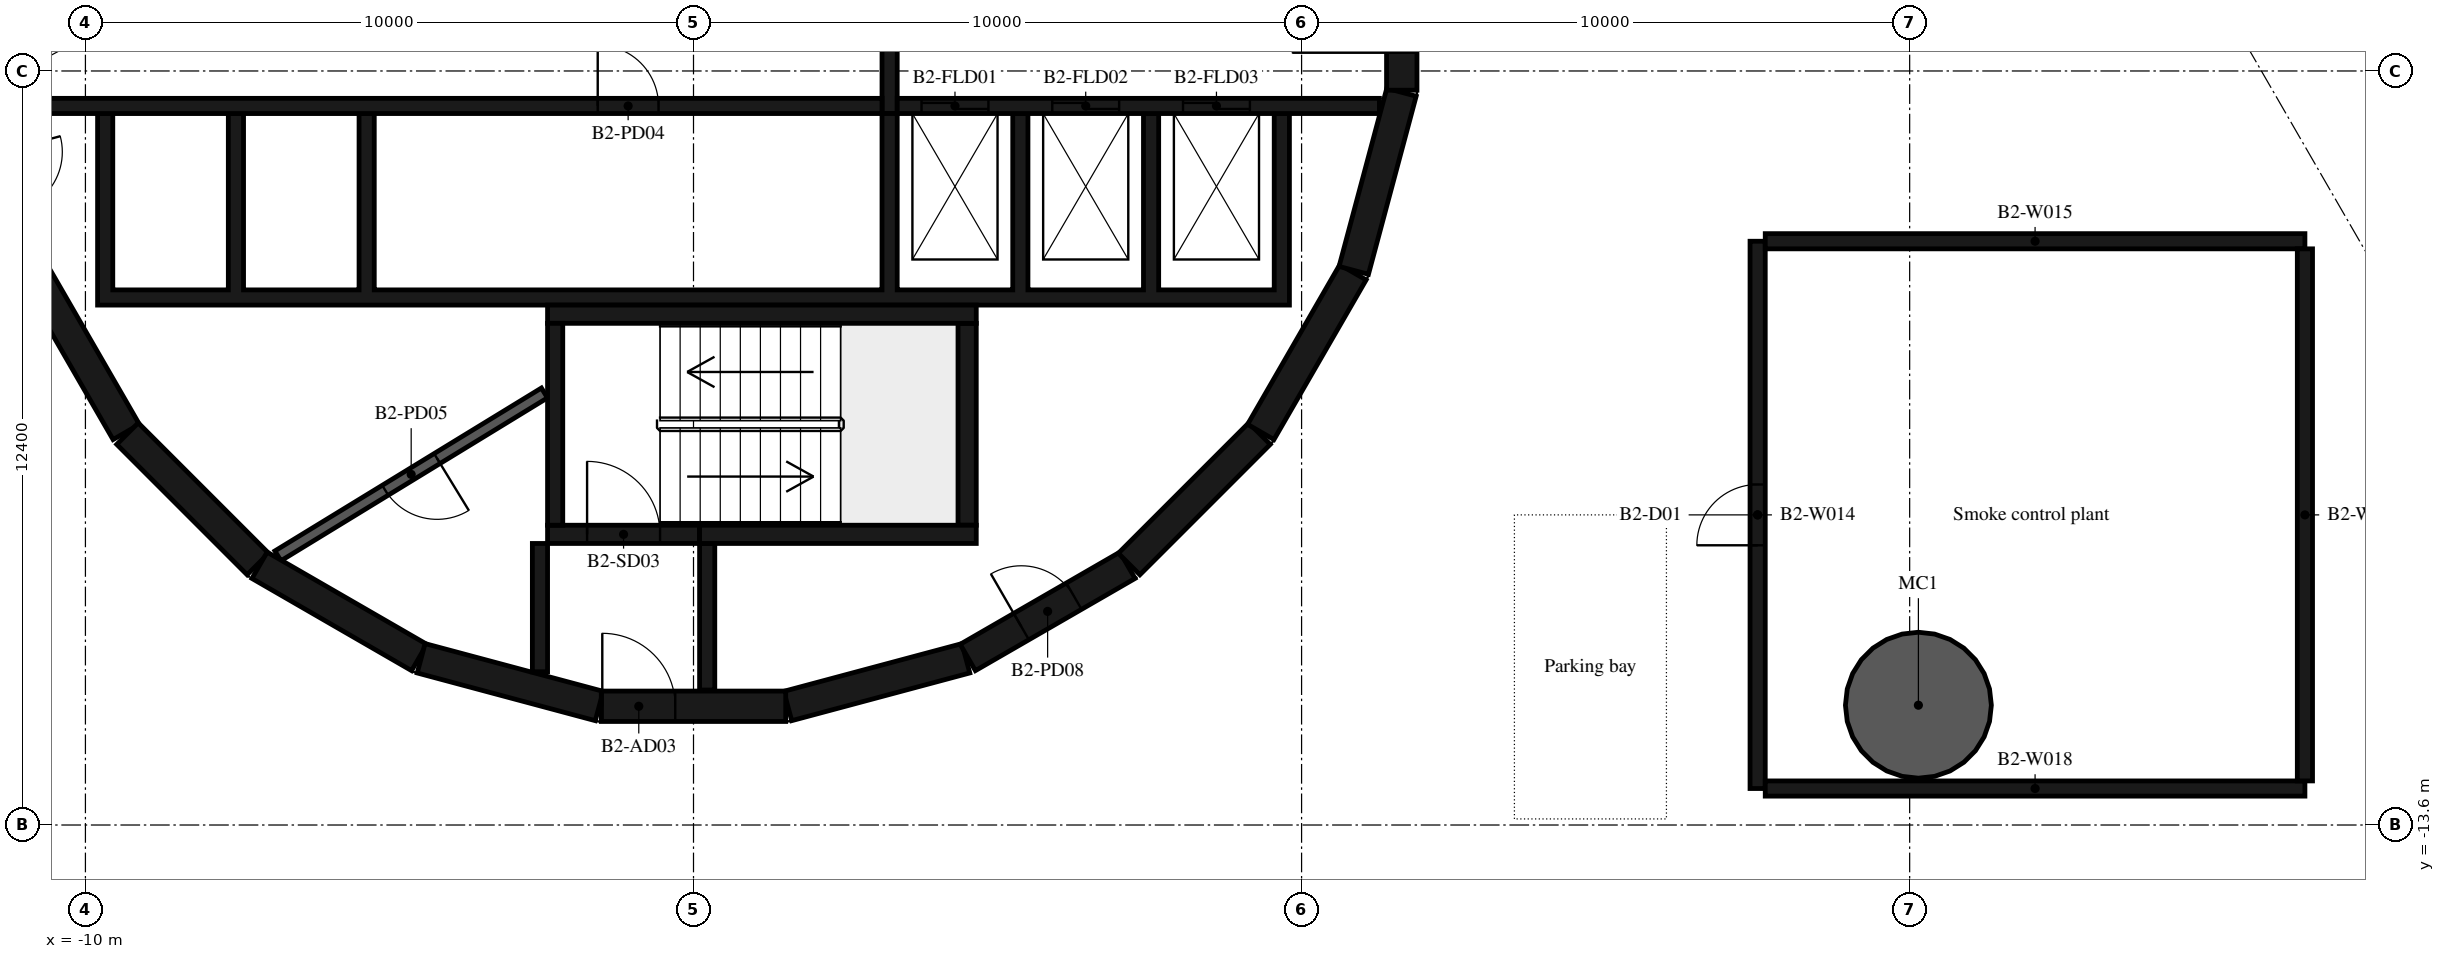
"""IFC4 building model, lengths in metres.
Left out: names, types, materials, properties, quantities, classifications, styles, units other than length and angle.
Written with IfcOpenShell. Run it as: python <this file> out.ifc"""

import sys

from ifc_helpers import new_model, si_unit, direction, frame, frame_2d, origin, origin_2d, place, context, subcontext, project, spatial, polyline, rectangle, hollow_circle, outline, extrude, element, fill, save


model = new_model("IFC4")
c1 = context("Model", 3, precision=1e-05, world=origin(), true_north=direction((0.0, 1.0)))
c2 = subcontext(c1, "Body", "Model", "MODEL_VIEW")
j1 = project(units=[si_unit("LENGTHUNIT", "METRE"), si_unit("PLANEANGLEUNIT", "RADIAN")], contexts=[c1])
p1 = place(None, origin())
s1 = spatial("IfcSite", under=j1, at=p1, CompositionType="ELEMENT")
p2 = place(p1, origin())
s2 = spatial("IfcBuilding", under=s1, at=p2, CompositionType="ELEMENT")
p3 = place(p2, frame((0.0, 0.0, -8.4)))
s3 = spatial("IfcBuildingStorey", under=s2, at=p3, CompositionType="ELEMENT", Elevation=-8.4)
p4 = place(p3, frame((20.144, -11.63, 0.0), z_axis=(0.0, 0.0, 1.0), x_axis=(1.0, 0.0, 0.0)))
e1 = element("IfcColumn", 1, at=p4, inside=s3, PredefinedType="COLUMN", context=c2, shape_type="SweptSolid", body=[
    extrude(hollow_circle(Radius=1.2, WallThickness=0.06, at=origin_2d()), origin(), (0.0, 0.0, 1.0), 3.82),
])
p5 = place(p3, frame((1.55, -11.643, 0.0), z_axis=(0.0, 0.0, 1.0), x_axis=(0.965948410781, 0.258734743916, 0.0)))
e2 = element("IfcWall", 2, at=p5, inside=s3, PredefinedType="SHEAR", context=c2, shape_type="SweptSolid", body=[
    extrude(rectangle(XDim=3.033, YDim=0.5, at=frame_2d((1.516, 0.0))), origin(), (0.0, 0.0, 1.0), 3.82),
])
p6 = place(p3, frame((4.51, -10.845, 0.0), z_axis=(0.0, 0.0, 1.0), x_axis=(0.865975092491, 0.500087131594, 0.0)))
e3 = element("IfcWall", 3, at=p6, inside=s3, PredefinedType="SHEAR", context=c2, shape_type="SweptSolid", body=[
    extrude(rectangle(XDim=3.033, YDim=0.5, at=frame_2d((1.516, 0.0))), origin(), (0.0, 0.0, 1.0), 3.82),
])
p7 = place(p6, frame((1.016, 0.0, 0.0)))
e4 = element("IfcOpeningElement", 4, at=p7, cuts=e3, PredefinedType="OPENING", context=c2, shape_type="SweptSolid", body=[
    extrude(rectangle(XDim=1.0, YDim=2.4, at=frame_2d((0.5, 1.2))), frame((0.0, 0.26, 0.0), z_axis=(0.0, -1.0, 0.0), x_axis=(1.0, 0.0, 0.0)), (0.0, 0.0, 1.0), 0.52),
])
p8 = place(p3, frame((7.164, -9.308, 0.0), z_axis=(0.0, 0.0, 1.0), x_axis=(0.707106781187, 0.707106781187, 0.0)))
e5 = element("IfcWall", 5, at=p8, inside=s3, PredefinedType="SHEAR", context=c2, shape_type="SweptSolid", body=[
    extrude(rectangle(XDim=3.032, YDim=0.5, at=frame_2d((1.516, 0.0))), origin(), (0.0, 0.0, 1.0), 3.82),
])
for number, where, z_axis, x_axis in (
    (6, (9.329, -7.137, 0.0), (0.0, 0.0, 1.0), (0.5, 0.866, 0.0)),
    (7, (10.858, -4.479, 0.0), (0.0, 0.0, 1.0), (0.259, 0.966, 0.0)),
):
    element("IfcWall", number, at=place(p3, frame(where, z_axis=z_axis, x_axis=x_axis)), inside=s3, PredefinedType="SHEAR", context=c2, shape_type="SweptSolid", body=[
        extrude(rectangle(XDim=3.033, YDim=0.5, at=frame_2d((1.516, 0.0))), origin(), (0.0, 0.0, 1.0), 3.82),
    ])
p9 = place(p3, frame((11.647, -1.516, 0.0), z_axis=(0.0, 0.0, 1.0), x_axis=(0.0, 1.0, 0.0)))
e8 = element("IfcWall", 8, at=p9, inside=s3, PredefinedType="SHEAR", context=c2, shape_type="SweptSolid", body=[
    extrude(rectangle(XDim=3.033, YDim=0.5, at=frame_2d((1.516, 0.0))), origin(), (0.0, 0.0, 1.0), 3.82),
])
p10 = place(p9, frame((0.616, 0.0, 0.0)))
e9 = element("IfcOpeningElement", 9, at=p10, cuts=e8, PredefinedType="OPENING", context=c2, shape_type="SweptSolid", body=[
    extrude(rectangle(XDim=1.8, YDim=2.1, at=frame_2d((0.9, 1.05))), frame((0.0, 0.26, 0.0), z_axis=(0.0, -1.0, 0.0), x_axis=(1.0, 0.0, 0.0)), (0.0, 0.0, 1.0), 0.52),
])
p11 = place(p3, frame((-10.845, -4.51, 0.0), z_axis=(0.0, 0.0, 1.0), x_axis=(0.500087131594, -0.865975092491, 0.0)))
e10 = element("IfcWall", 10, at=p11, inside=s3, PredefinedType="SHEAR", context=c2, shape_type="SweptSolid", body=[
    extrude(rectangle(XDim=3.033, YDim=0.5, at=frame_2d((1.516, 0.0))), origin(), (0.0, 0.0, 1.0), 3.82),
])
p12 = place(p3, frame((-9.308, -7.164, 0.0), z_axis=(0.0, 0.0, 1.0), x_axis=(0.707106781187, -0.707106781187, 0.0)))
e11 = element("IfcWall", 11, at=p12, inside=s3, PredefinedType="SHEAR", context=c2, shape_type="SweptSolid", body=[
    extrude(rectangle(XDim=3.032, YDim=0.5, at=frame_2d((1.516, 0.0))), origin(), (0.0, 0.0, 1.0), 3.82),
])
for number, where, z_axis, x_axis in (
    (12, (-7.137, -9.329, 0.0), (0.0, 0.0, 1.0), (0.866, -0.5, 0.0)),
    (13, (-4.479, -10.858, 0.0), (0.0, 0.0, 1.0), (0.966, -0.259, 0.0)),
):
    element("IfcWall", number, at=place(p3, frame(where, z_axis=z_axis, x_axis=x_axis)), inside=s3, PredefinedType="SHEAR", context=c2, shape_type="SweptSolid", body=[
        extrude(rectangle(XDim=3.033, YDim=0.5, at=frame_2d((1.516, 0.0))), origin(), (0.0, 0.0, 1.0), 3.82),
    ])
p13 = place(p3, frame((-1.516, -11.647, 0.0), z_axis=(0.0, 0.0, 1.0), x_axis=(1.0, 0.0, 0.0)))
e14 = element("IfcWall", 14, at=p13, inside=s3, PredefinedType="SHEAR", context=c2, shape_type="SweptSolid", body=[
    extrude(rectangle(XDim=3.033, YDim=0.5, at=frame_2d((1.516, 0.0))), origin(), (0.0, 0.0, 1.0), 3.82),
])
p14 = place(p13, frame((0.016, 0.0, 0.0)))
e15 = element("IfcOpeningElement", 15, at=p14, cuts=e14, PredefinedType="OPENING", context=c2, shape_type="SweptSolid", body=[
    extrude(rectangle(XDim=1.2, YDim=2.1, at=frame_2d((0.6, 1.05))), frame((0.0, 0.26, 0.0), z_axis=(0.0, -1.0, 0.0), x_axis=(1.0, 0.0, 0.0)), (0.0, 0.0, 1.0), 0.52),
])
p15 = place(p3, frame((-2.275, -8.67, 0.0), z_axis=(0.0, 0.0, 1.0), x_axis=(0.0, 1.0, 0.0)))
e16 = element("IfcWall", 16, at=p15, inside=s3, PredefinedType="SHEAR", context=c2, shape_type="SweptSolid", body=[
    extrude(rectangle(XDim=3.32, YDim=0.25, at=frame_2d((1.66, 0.0))), origin(), (0.0, 0.0, 1.0), 3.82),
])
p16 = place(p3, frame((-2.4, -5.2, 0.0), z_axis=(0.0, 0.0, 1.0), x_axis=(1.0, 0.0, 0.0)))
e17 = element("IfcWall", 17, at=p16, inside=s3, PredefinedType="SHEAR", context=c2, shape_type="SweptSolid", body=[
    extrude(rectangle(XDim=7.05, YDim=0.3, at=frame_2d((3.525, 0.0))), origin(), (0.0, 0.0, 1.0), 3.82),
])
p17 = place(p3, frame((4.5, -8.67, 0.0), z_axis=(0.0, 0.0, 1.0), x_axis=(0.0, 1.0, 0.0)))
e18 = element("IfcWall", 18, at=p17, inside=s3, PredefinedType="SHEAR", context=c2, shape_type="SweptSolid", body=[
    extrude(rectangle(XDim=3.32, YDim=0.3, at=frame_2d((1.66, 0.0))), origin(), (0.0, 0.0, 1.0), 3.82),
])
p18 = place(p3, frame((0.1, -8.82, 0.0), z_axis=(0.0, 0.0, 1.0), x_axis=(1.0, 0.0, 0.0)))
e19 = element("IfcWall", 19, at=p18, inside=s3, PredefinedType="SHEAR", context=c2, shape_type="SweptSolid", body=[
    extrude(rectangle(XDim=4.55, YDim=0.3, at=frame_2d((2.275, 0.0))), origin(), (0.0, 0.0, 1.0), 3.82),
])
p19 = place(p3, frame((-2.4, -8.82, 0.0), z_axis=(0.0, 0.0, 1.0), x_axis=(1.0, 0.0, 0.0)))
e20 = element("IfcWall", 20, at=p19, inside=s3, PredefinedType="SHEAR", context=c2, shape_type="SweptSolid", body=[
    extrude(rectangle(XDim=2.5, YDim=0.3, at=frame_2d((1.25, 0.0))), origin(), (0.0, 0.0, 1.0), 3.82),
])
p20 = place(p19, frame((0.65, 0.0, 0.0)))
e21 = element("IfcOpeningElement", 21, at=p20, cuts=e20, PredefinedType="OPENING", context=c2, shape_type="SweptSolid", body=[
    extrude(rectangle(XDim=1.2, YDim=2.1, at=frame_2d((0.6, 1.05))), frame((0.0, 0.16, 0.0), z_axis=(0.0, -1.0, 0.0), x_axis=(1.0, 0.0, 0.0)), (0.0, 0.0, 1.0), 0.32),
])
p21 = place(p3, frame((-2.525, -8.97, 0.0), z_axis=(0.0, 0.0, 1.0), x_axis=(0.0, -1.0, 0.0)))
e22 = element("IfcWall", 22, at=p21, inside=s3, PredefinedType="SHEAR", context=c2, shape_type="SweptSolid", body=[
    extrude(rectangle(XDim=2.11, YDim=0.25, at=frame_2d((1.055, 0.0))), origin(), (0.0, 0.0, 1.0), 3.82),
])
p22 = place(p3, frame((0.225, -8.97, 0.0), z_axis=(0.0, 0.0, 1.0), x_axis=(0.0, -1.0, 0.0)))
e23 = element("IfcWall", 23, at=p22, inside=s3, PredefinedType="SHEAR", context=c2, shape_type="SweptSolid", body=[
    extrude(rectangle(XDim=2.41, YDim=0.25, at=frame_2d((1.205, 0.0))), origin(), (0.0, 0.0, 1.0), 3.82),
])
p23 = place(p3, origin())
e24 = element("IfcWall", 24, at=p23, inside=s3, PredefinedType="SHEAR", context=c2, shape_type="SweptSolid", body=[
    extrude(outline(polyline([(9.8, -5.05), (9.8, -4.8), (9.8, -1.9), (9.55, -1.9), (9.55, -4.8), (7.65, -4.8), (7.65, -1.9), (7.4, -1.9), (7.4, -4.8), (5.5, -4.8), (5.5, -1.9), (5.25, -1.9), (5.25, -4.8), (3.35, -4.8), (3.35, -1.9), (3.1, -1.9), (3.1, -4.8), (-5.25, -4.8), (-5.25, -1.9), (-5.5, -1.9), (-5.5, -4.8), (-7.4, -4.8), (-7.4, -1.9), (-7.65, -1.9), (-7.65, -4.8), (-9.55, -4.8), (-9.55, -1.9), (-9.8, -1.9), (-9.8, -4.8), (-9.8, -5.05), (9.8, -5.05)])), origin(), (0.0, 0.0, 1.0), 3.82),
])
p24 = place(p3, frame((-11.28, -1.775, 0.0), z_axis=(0.0, 0.0, 1.0), x_axis=(1.0, 0.0, 0.0)))
e25 = element("IfcWall", 25, at=p24, inside=s3, PredefinedType="SHEAR", context=c2, shape_type="SweptSolid", body=[
    extrude(rectangle(XDim=14.38, YDim=0.25, at=frame_2d((7.19, 0.0))), origin(), (0.0, 0.0, 1.0), 3.82),
])
p25 = place(p24, frame((9.705, 0.0, 0.0)))
e26 = element("IfcOpeningElement", 26, at=p25, cuts=e25, PredefinedType="OPENING", context=c2, shape_type="SweptSolid", body=[
    extrude(rectangle(XDim=1.0, YDim=2.4, at=frame_2d((0.5, 1.2))), frame((0.0, 0.135, 0.0), z_axis=(0.0, -1.0, 0.0), x_axis=(1.0, 0.0, 0.0)), (0.0, 0.0, 1.0), 0.27),
])
p26 = place(p3, frame((3.35, -1.775, 0.0), z_axis=(0.0, 0.0, 1.0), x_axis=(1.0, 0.0, 0.0)))
e27 = element("IfcWall", 27, at=p26, inside=s3, PredefinedType="SHEAR", context=c2, shape_type="SweptSolid", body=[
    extrude(rectangle(XDim=7.93, YDim=0.25, at=frame_2d((3.965, 0.0))), origin(), (0.0, 0.0, 1.0), 3.82),
])
p27 = place(p26, frame((0.4, 0.0, 0.0)))
e28 = element("IfcOpeningElement", 28, at=p27, cuts=e27, PredefinedType="OPENING", context=c2, shape_type="SweptSolid", body=[
    extrude(rectangle(XDim=1.1, YDim=2.4, at=frame_2d((0.55, 1.2))), frame((0.0, 0.135, 0.0), z_axis=(0.0, -1.0, 0.0), x_axis=(1.0, 0.0, 0.0)), (0.0, 0.0, 1.0), 0.27),
])
p28 = place(p26, frame((2.55, 0.0, 0.0)))
e29 = element("IfcOpeningElement", 29, at=p28, cuts=e27, PredefinedType="OPENING", context=c2, shape_type="SweptSolid", body=[
    extrude(rectangle(XDim=1.1, YDim=2.4, at=frame_2d((0.55, 1.2))), frame((0.0, 0.135, 0.0), z_axis=(0.0, -1.0, 0.0), x_axis=(1.0, 0.0, 0.0)), (0.0, 0.0, 1.0), 0.27),
])
p29 = place(p26, frame((4.7, 0.0, 0.0)))
e30 = element("IfcOpeningElement", 30, at=p29, cuts=e27, PredefinedType="OPENING", context=c2, shape_type="SweptSolid", body=[
    extrude(rectangle(XDim=1.1, YDim=2.4, at=frame_2d((0.55, 1.2))), frame((0.0, 0.135, 0.0), z_axis=(0.0, -1.0, 0.0), x_axis=(1.0, 0.0, 0.0)), (0.0, 0.0, 1.0), 0.27),
])
p30 = place(p3, frame((3.225, -1.9, 0.0), z_axis=(0.0, 0.0, 1.0), x_axis=(0.0, 1.0, 0.0)))
e31 = element("IfcWall", 31, at=p30, inside=s3, PredefinedType="SHEAR", context=c2, shape_type="SweptSolid", body=[
    extrude(rectangle(XDim=3.8, YDim=0.25, at=frame_2d((1.9, 0.0))), origin(), (0.0, 0.0, 1.0), 3.82),
])
p31 = place(p3, frame((-2.451, -6.495, 0.0), z_axis=(0.0, 0.0, 1.0), x_axis=(-0.853250115418, -0.521501908471, 0.0)))
e32 = element("IfcWall", 32, at=p31, inside=s3, PredefinedType="PARTITIONING", context=c2, shape_type="SweptSolid", body=[
    extrude(rectangle(XDim=5.137, YDim=0.19, at=frame_2d((2.569, 0.0))), origin(), (0.0, 0.0, 1.0), 3.82),
])
p32 = place(p31, frame((2.069, 0.0, 0.0)))
e33 = element("IfcOpeningElement", 33, at=p32, cuts=e32, PredefinedType="OPENING", context=c2, shape_type="SweptSolid", body=[
    extrude(rectangle(XDim=1.0, YDim=2.4, at=frame_2d((0.5, 1.2))), frame((0.0, 0.105, 0.0), z_axis=(0.0, -1.0, 0.0), x_axis=(1.0, 0.0, 0.0)), (0.0, 0.0, 1.0), 0.21),
])
p33 = place(p3, frame((17.5, -13.0, 0.0), z_axis=(0.0, 0.0, 1.0), x_axis=(0.0, 1.0, 0.0)))
e34 = element("IfcWall", 34, at=p33, inside=s3, PredefinedType="PARTITIONING", context=c2, shape_type="SweptSolid", body=[
    extrude(rectangle(XDim=9.0, YDim=0.25, at=frame_2d((4.5, 0.0))), origin(), (0.0, 0.0, 1.0), 3.82),
])
p34 = place(p33, frame((4.0, 0.0, 0.0)))
e35 = element("IfcOpeningElement", 35, at=p34, cuts=e34, PredefinedType="OPENING", context=c2, shape_type="SweptSolid", body=[
    extrude(rectangle(XDim=1.0, YDim=2.1, at=frame_2d((0.5, 1.05))), frame((0.0, 0.135, 0.0), z_axis=(0.0, -1.0, 0.0), x_axis=(1.0, 0.0, 0.0)), (0.0, 0.0, 1.0), 0.27),
])
for number, where, z_axis, x_axis in (
    (36, (17.625, -4.0, 0.0), (0.0, 0.0, 1.0), (1.0, 0.0, 0.0)),
    (37, (26.5, -13.0, 0.0), (0.0, 0.0, 1.0), (-1.0, 0.0, 0.0)),
):
    element("IfcWall", number, at=place(p3, frame(where, z_axis=z_axis, x_axis=x_axis)), inside=s3, PredefinedType="PARTITIONING", context=c2, shape_type="SweptSolid", body=[
        extrude(rectangle(XDim=8.875, YDim=0.25, at=frame_2d((4.438, 0.0))), origin(), (0.0, 0.0, 1.0), 3.82),
    ])
p35 = place(p3, frame((26.5, -4.125, 0.0), z_axis=(0.0, 0.0, 1.0), x_axis=(0.0, -1.0, 0.0)))
e38 = element("IfcWall", 38, at=p35, inside=s3, PredefinedType="PARTITIONING", context=c2, shape_type="SweptSolid", body=[
    extrude(rectangle(XDim=8.75, YDim=0.25, at=frame_2d((4.375, 0.0))), origin(), (0.0, 0.0, 1.0), 3.82),
])
p36 = place(p20, origin())
e39 = element("IfcDoor", 39, at=p36, inside=s3, OperationType="SINGLE_SWING_LEFT", PredefinedType="DOOR", context=c2, shape_type="SweptSolid", body=[
    extrude(rectangle(XDim=1.2, YDim=2.1, at=frame_2d((0.6, 1.05))), frame((0.0, 0.025, 0.0), z_axis=(0.0, -1.0, 0.0), x_axis=(1.0, 0.0, 0.0)), (0.0, 0.0, 1.0), 0.05),
])
fill(e21, e39)
p37 = place(p14, origin())
e40 = element("IfcDoor", 40, at=p37, inside=s3, OperationType="SINGLE_SWING_RIGHT", PredefinedType="DOOR", context=c2, shape_type="SweptSolid", body=[
    extrude(rectangle(XDim=1.2, YDim=2.1, at=frame_2d((0.6, 1.05))), frame((0.0, 0.025, 0.0), z_axis=(0.0, -1.0, 0.0), x_axis=(1.0, 0.0, 0.0)), (0.0, 0.0, 1.0), 0.05),
])
fill(e15, e40)
p38 = place(p10, origin())
e41 = element("IfcDoor", 41, at=p38, inside=s3, OperationType="DOUBLE_DOOR_SINGLE_SWING", PredefinedType="DOOR", context=c2, shape_type="SweptSolid", body=[
    extrude(rectangle(XDim=1.8, YDim=2.1, at=frame_2d((0.9, 1.05))), frame((0.0, 0.025, 0.0), z_axis=(0.0, -1.0, 0.0), x_axis=(1.0, 0.0, 0.0)), (0.0, 0.0, 1.0), 0.05),
])
fill(e9, e41)
p39 = place(p27, origin())
e42 = element("IfcDoor", 42, at=p39, inside=s3, OperationType="DOUBLE_DOOR_SLIDING", PredefinedType="DOOR", context=c2, shape_type="SweptSolid", body=[
    extrude(rectangle(XDim=1.1, YDim=2.4, at=frame_2d((0.55, 1.2))), frame((0.0, 0.025, 0.0), z_axis=(0.0, -1.0, 0.0), x_axis=(1.0, 0.0, 0.0)), (0.0, 0.0, 1.0), 0.05),
])
fill(e28, e42)
p40 = place(p28, origin())
e43 = element("IfcDoor", 43, at=p40, inside=s3, OperationType="DOUBLE_DOOR_SLIDING", PredefinedType="DOOR", context=c2, shape_type="SweptSolid", body=[
    extrude(rectangle(XDim=1.1, YDim=2.4, at=frame_2d((0.55, 1.2))), frame((0.0, 0.025, 0.0), z_axis=(0.0, -1.0, 0.0), x_axis=(1.0, 0.0, 0.0)), (0.0, 0.0, 1.0), 0.05),
])
fill(e29, e43)
p41 = place(p29, origin())
e44 = element("IfcDoor", 44, at=p41, inside=s3, OperationType="DOUBLE_DOOR_SLIDING", PredefinedType="DOOR", context=c2, shape_type="SweptSolid", body=[
    extrude(rectangle(XDim=1.1, YDim=2.4, at=frame_2d((0.55, 1.2))), frame((0.0, 0.025, 0.0), z_axis=(0.0, -1.0, 0.0), x_axis=(1.0, 0.0, 0.0)), (0.0, 0.0, 1.0), 0.05),
])
fill(e30, e44)
p42 = place(p25, origin())
e45 = element("IfcDoor", 45, at=p42, inside=s3, OperationType="SINGLE_SWING_LEFT", PredefinedType="DOOR", context=c2, shape_type="SweptSolid", body=[
    extrude(rectangle(XDim=1.0, YDim=2.4, at=frame_2d((0.5, 1.2))), frame((0.0, 0.025, 0.0), z_axis=(0.0, -1.0, 0.0), x_axis=(1.0, 0.0, 0.0)), (0.0, 0.0, 1.0), 0.05),
])
fill(e26, e45)
p43 = place(p32, origin())
e46 = element("IfcDoor", 46, at=p43, inside=s3, OperationType="SINGLE_SWING_RIGHT", PredefinedType="DOOR", context=c2, shape_type="SweptSolid", body=[
    extrude(rectangle(XDim=1.0, YDim=2.4, at=frame_2d((0.5, 1.2))), frame((0.0, 0.025, 0.0), z_axis=(0.0, -1.0, 0.0), x_axis=(1.0, 0.0, 0.0)), (0.0, 0.0, 1.0), 0.05),
])
fill(e33, e46)
p44 = place(p7, origin())
e47 = element("IfcDoor", 47, at=p44, inside=s3, OperationType="SINGLE_SWING_LEFT", PredefinedType="DOOR", context=c2, shape_type="SweptSolid", body=[
    extrude(rectangle(XDim=1.0, YDim=2.4, at=frame_2d((0.5, 1.2))), frame((0.0, 0.025, 0.0), z_axis=(0.0, -1.0, 0.0), x_axis=(1.0, 0.0, 0.0)), (0.0, 0.0, 1.0), 0.05),
])
fill(e4, e47)
p45 = place(p34, origin())
e48 = element("IfcDoor", 48, at=p45, inside=s3, OperationType="SINGLE_SWING_LEFT", PredefinedType="DOOR", context=c2, shape_type="SweptSolid", body=[
    extrude(rectangle(XDim=1.0, YDim=2.1, at=frame_2d((0.5, 1.05))), frame((0.0, 0.025, 0.0), z_axis=(0.0, -1.0, 0.0), x_axis=(1.0, 0.0, 0.0)), (0.0, 0.0, 1.0), 0.05),
])
fill(e35, e48)
save(model, sys.argv[1])
